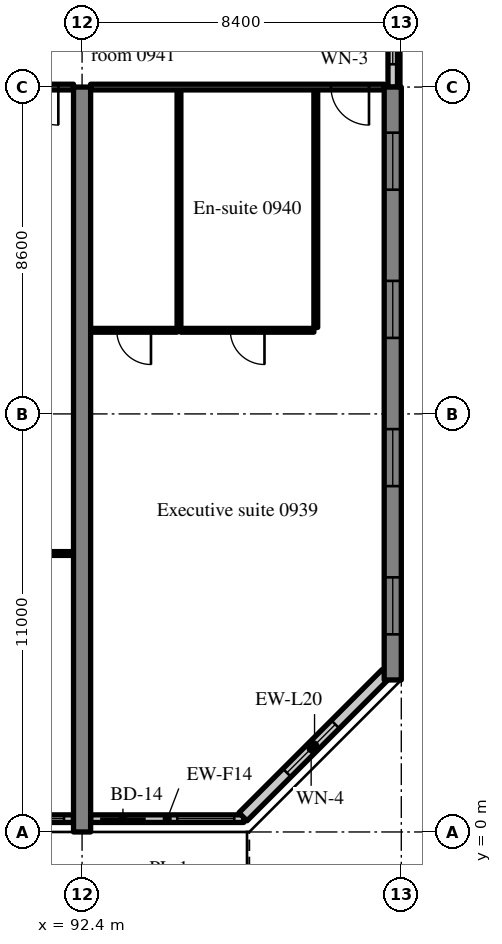
"""IFC4 building model, lengths in metres.
Left out: names, types, materials, properties, quantities, classifications, styles, units other than length and angle.
Written with IfcOpenShell. Run it as: python <this file> out.ifc"""

import sys

from ifc_helpers import new_model, si_unit, direction, frame, frame_2d, origin, place, context, subcontext, project, spatial, rectangle, extrude, source, transform, mapped, element, fill, save


model = new_model("IFC4")
c1 = context("Model", 3, precision=1e-05, world=origin(), true_north=direction((0.0, 1.0)))
c2 = subcontext(c1, "Body", "Model", "MODEL_VIEW")
j1 = project(units=[si_unit("LENGTHUNIT", "METRE"), si_unit("PLANEANGLEUNIT", "RADIAN")], contexts=[c1])
p1 = place(None, origin())
s1 = spatial("IfcSite", under=j1, at=p1, CompositionType="ELEMENT")
p2 = place(p1, origin())
s2 = spatial("IfcBuilding", under=s1, at=p2, CompositionType="ELEMENT")
p3 = place(p2, frame((0.0, 0.0, 43.0)))
s3 = spatial("IfcBuildingStorey", under=s2, at=p3, CompositionType="ELEMENT", Elevation=43.0)
m1 = source(origin(), c2, "Body", "SweptSolid", [
    extrude(rectangle(XDim=19.6, YDim=0.45, at=frame_2d((9.8, 0.0))), origin(), (0.0, 0.0, 1.0), 3.52),
])
p4 = place(p3, frame((92.4, 0.0, 0.0), z_axis=(0.0, 0.0, 1.0), x_axis=(0.0, 1.0, 0.0)))
e1 = element("IfcWall", 1, at=p4, inside=s3, PredefinedType="SHEAR", context=c2, shape_type="MappedRepresentation", body=[
    mapped(m1, transform((0.0, 0.0, 0.0), scale=1.0)),
])
m2 = source(origin(), c2, "Body", "SweptSolid", [
    extrude(rectangle(XDim=15.6, YDim=0.45, at=frame_2d((7.8, 0.0))), origin(), (0.0, 0.0, 1.0), 3.52),
])
p5 = place(p3, frame((100.575, 4.0, 0.0), z_axis=(0.0, 0.0, 1.0), x_axis=(0.0, 1.0, 0.0)))
e2 = element("IfcWall", 2, at=p5, inside=s3, PredefinedType="SHEAR", context=c2, shape_type="MappedRepresentation", body=[
    mapped(m2, transform((0.0, 0.0, 0.0), scale=1.0)),
])
m3 = source(origin(), c2, "Body", "SweptSolid", [
    extrude(rectangle(XDim=1.5, YDim=1.5, at=frame_2d((0.75, 0.75))), frame((0.0, 0.235, 0.0), z_axis=(0.0, -1.0, 0.0), x_axis=(1.0, 0.0, 0.0)), (0.0, 0.0, 1.0), 0.47),
])
p6 = place(p5, frame((1.2, 0.0, 0.9)))
e3 = element("IfcOpeningElement", 3, at=p6, cuts=e2, PredefinedType="OPENING", context=c2, shape_type="MappedRepresentation", body=[
    mapped(m3, transform((0.0, 0.0, 0.0), scale=1.0)),
])
p7 = place(p5, frame((5.1, 0.0, 0.9)))
e4 = element("IfcOpeningElement", 4, at=p7, cuts=e2, PredefinedType="OPENING", context=c2, shape_type="MappedRepresentation", body=[
    mapped(m3, transform((0.0, 0.0, 0.0), scale=1.0)),
])
p8 = place(p5, frame((9.0, 0.0, 0.9)))
e5 = element("IfcOpeningElement", 5, at=p8, cuts=e2, PredefinedType="OPENING", context=c2, shape_type="MappedRepresentation", body=[
    mapped(m3, transform((0.0, 0.0, 0.0), scale=1.0)),
])
p9 = place(p5, frame((12.9, 0.0, 0.9)))
e6 = element("IfcOpeningElement", 6, at=p9, cuts=e2, PredefinedType="OPENING", context=c2, shape_type="MappedRepresentation", body=[
    mapped(m3, transform((0.0, 0.0, 0.0), scale=1.0)),
])
m4 = source(origin(), c2, "Body", "SweptSolid", [
    extrude(rectangle(XDim=3.525, YDim=0.2, at=frame_2d((1.763, 0.0))), origin(), (0.0, 0.0, 1.0), 2.82),
])
p10 = place(p3, frame((88.65, 0.35, 0.0), z_axis=(0.0, 0.0, 1.0), x_axis=(1.0, 0.0, 0.0)))
e7 = element("IfcWall", 7, at=p10, inside=s3, PredefinedType="SOLIDWALL", context=c2, shape_type="MappedRepresentation", body=[
    mapped(m4, transform((0.0, 0.0, 0.0), scale=1.0)),
])
m5 = source(origin(), c2, "Body", "SweptSolid", [
    extrude(rectangle(XDim=1.2, YDim=2.4, at=frame_2d((0.6, 1.2))), frame((0.0, 0.11, 0.0), z_axis=(0.0, -1.0, 0.0), x_axis=(1.0, 0.0, 0.0)), (0.0, 0.0, 1.0), 0.22),
])
p11 = place(p10, frame((0.25, 0.0, 0.0)))
e8 = element("IfcOpeningElement", 8, at=p11, cuts=e7, PredefinedType="OPENING", context=c2, shape_type="MappedRepresentation", body=[
    mapped(m5, transform((0.0, 0.0, 0.0), scale=1.0)),
])
m6 = source(origin(), c2, "Body", "SweptSolid", [
    extrude(rectangle(XDim=1.5, YDim=1.5, at=frame_2d((0.75, 0.75))), frame((0.0, 0.11, 0.0), z_axis=(0.0, -1.0, 0.0), x_axis=(1.0, 0.0, 0.0)), (0.0, 0.0, 1.0), 0.22),
])
p12 = place(p10, frame((1.775, 0.0, 0.9)))
e9 = element("IfcOpeningElement", 9, at=p12, cuts=e7, PredefinedType="OPENING", context=c2, shape_type="MappedRepresentation", body=[
    mapped(m6, transform((0.0, 0.0, 0.0), scale=1.0)),
])
m7 = source(origin(), c2, "Body", "SweptSolid", [
    extrude(rectangle(XDim=4.03, YDim=0.2, at=frame_2d((2.015, 0.0))), origin(), (0.0, 0.0, 1.0), 2.82),
])
p13 = place(p3, frame((92.625, 0.35, 0.0), z_axis=(0.0, 0.0, 1.0), x_axis=(1.0, 0.0, 0.0)))
e10 = element("IfcWall", 10, at=p13, inside=s3, PredefinedType="SOLIDWALL", context=c2, shape_type="MappedRepresentation", body=[
    mapped(m7, transform((0.0, 0.0, 0.0), scale=1.0)),
])
p14 = place(p13, frame((0.25, 0.0, 0.0)))
e11 = element("IfcOpeningElement", 11, at=p14, cuts=e10, PredefinedType="OPENING", context=c2, shape_type="MappedRepresentation", body=[
    mapped(m5, transform((0.0, 0.0, 0.0), scale=1.0)),
])
p15 = place(p13, frame((2.28, 0.0, 0.9)))
e12 = element("IfcOpeningElement", 12, at=p15, cuts=e10, PredefinedType="OPENING", context=c2, shape_type="MappedRepresentation", body=[
    mapped(m6, transform((0.0, 0.0, 0.0), scale=1.0)),
])
m8 = source(origin(), c2, "Body", "SweptSolid", [
    extrude(rectangle(XDim=5.326, YDim=0.3, at=frame_2d((2.663, 0.0))), origin(), (0.0, 0.0, 1.0), 3.52),
])
p16 = place(p3, frame((96.634, 0.4, 0.0), z_axis=(0.0, 0.0, 1.0), x_axis=(0.707083859269, 0.707129702361, 0.0)))
e13 = element("IfcWall", 13, at=p16, inside=s3, PredefinedType="SOLIDWALL", context=c2, shape_type="MappedRepresentation", body=[
    mapped(m8, transform((0.0, 0.0, 0.0), scale=1.0)),
])
m9 = source(origin(), c2, "Body", "SweptSolid", [
    extrude(rectangle(XDim=1.8, YDim=1.5, at=frame_2d((0.9, 0.75))), frame((0.0, 0.16, 0.0), z_axis=(0.0, -1.0, 0.0), x_axis=(1.0, 0.0, 0.0)), (0.0, 0.0, 1.0), 0.32),
])
p17 = place(p16, frame((1.636, 0.0, 0.9)))
e14 = element("IfcOpeningElement", 14, at=p17, cuts=e13, PredefinedType="OPENING", context=c2, shape_type="MappedRepresentation", body=[
    mapped(m9, transform((0.0, 0.0, 0.0), scale=1.0)),
])
m10 = source(origin(), c2, "Body", "SweptSolid", [
    extrude(rectangle(XDim=2.4, YDim=0.25, at=frame_2d((1.2, 0.0))), origin(), (0.0, 0.0, 1.0), 2.62),
])
p18 = place(p3, frame((100.575, 19.6, 0.0), z_axis=(0.0, 0.0, 1.0), x_axis=(0.0, 1.0, 0.0)))
e15 = element("IfcWall", 15, at=p18, inside=s3, PredefinedType="SOLIDWALL", context=c2, shape_type="MappedRepresentation", body=[
    mapped(m10, transform((0.0, 0.0, 0.0), scale=1.0)),
])
m11 = source(origin(), c2, "Body", "SweptSolid", [
    extrude(rectangle(XDim=1.2, YDim=1.5, at=frame_2d((0.6, 0.75))), frame((0.0, 0.135, 0.0), z_axis=(0.0, -1.0, 0.0), x_axis=(1.0, 0.0, 0.0)), (0.0, 0.0, 1.0), 0.27),
])
p19 = place(p18, frame((0.6, 0.0, 0.9)))
e16 = element("IfcOpeningElement", 16, at=p19, cuts=e15, PredefinedType="OPENING", context=c2, shape_type="MappedRepresentation", body=[
    mapped(m11, transform((0.0, 0.0, 0.0), scale=1.0)),
])
m12 = source(origin(), c2, "Body", "SweptSolid", [
    extrude(rectangle(XDim=7.95, YDim=0.1, at=frame_2d((3.975, 0.0))), origin(), (0.0, 0.0, 1.0), 3.52),
])
p20 = place(p3, frame((84.225, 7.327, 0.0), z_axis=(0.0, 0.0, 1.0), x_axis=(1.0, 0.0, 0.0)))
e17 = element("IfcWall", 17, at=p20, inside=s3, PredefinedType="PARTITIONING", context=c2, shape_type="MappedRepresentation", body=[
    mapped(m12, transform((0.0, 0.0, 0.0), scale=1.0)),
])
m13 = source(origin(), c2, "Body", "SweptSolid", [
    extrude(rectangle(XDim=1.8, YDim=2.1, at=frame_2d((0.9, 1.05))), frame((0.0, 0.06, 0.0), z_axis=(0.0, -1.0, 0.0), x_axis=(1.0, 0.0, 0.0)), (0.0, 0.0, 1.0), 0.12),
])
p21 = place(p20, frame((3.075, 0.0, 0.0)))
e18 = element("IfcOpeningElement", 18, at=p21, cuts=e17, PredefinedType="OPENING", context=c2, shape_type="MappedRepresentation", body=[
    mapped(m13, transform((0.0, 0.0, 0.0), scale=1.0)),
])
m14 = source(origin(), c2, "Body", "SweptSolid", [
    extrude(rectangle(XDim=7.95, YDim=0.15, at=frame_2d((3.975, 0.0))), origin(), (0.0, 0.0, 1.0), 2.82),
])
p22 = place(p3, frame((84.225, 19.6, 0.0), z_axis=(0.0, 0.0, 1.0), x_axis=(1.0, 0.0, 0.0)))
e19 = element("IfcWall", 19, at=p22, inside=s3, PredefinedType="PARTITIONING", context=c2, shape_type="MappedRepresentation", body=[
    mapped(m14, transform((0.0, 0.0, 0.0), scale=1.0)),
])
m15 = source(origin(), c2, "Body", "SweptSolid", [
    extrude(rectangle(XDim=1.0, YDim=2.1, at=frame_2d((0.5, 1.05))), frame((0.0, 0.085, 0.0), z_axis=(0.0, -1.0, 0.0), x_axis=(1.0, 0.0, 0.0)), (0.0, 0.0, 1.0), 0.17),
])
p23 = place(p22, frame((6.55, 0.0, 0.0)))
e20 = element("IfcOpeningElement", 20, at=p23, cuts=e19, PredefinedType="OPENING", context=c2, shape_type="MappedRepresentation", body=[
    mapped(m15, transform((0.0, 0.0, 0.0), scale=1.0)),
])
m16 = source(origin(), c2, "Body", "SweptSolid", [
    extrude(rectangle(XDim=6.25, YDim=0.1, at=frame_2d((3.125, 0.0))), origin(), (0.0, 0.0, 1.0), 3.52),
])
for number, where, z_axis, x_axis in (
    (21, (98.55, 13.275, 0.0), (0.0, 0.0, 1.0), (0.0, 1.0, 0.0)),
    (22, (94.95, 13.275, 0.0), (0.0, 0.0, 1.0), (0.0, 1.0, 0.0)),
):
    element("IfcWall", number, at=place(p3, frame(where, z_axis=z_axis, x_axis=x_axis)), inside=s3, PredefinedType="PARTITIONING", context=c2, shape_type="MappedRepresentation", body=[
        mapped(m16, transform((0.0, 0.0, 0.0), scale=1.0)),
    ])
m17 = source(origin(), c2, "Body", "SweptSolid", [
    extrude(rectangle(XDim=3.5, YDim=0.1, at=frame_2d((1.75, 0.0))), origin(), (0.0, 0.0, 1.0), 3.52),
])
p24 = place(p3, frame((95.0, 13.2, 0.0), z_axis=(0.0, 0.0, 1.0), x_axis=(1.0, 0.0, 0.0)))
e23 = element("IfcWall", 23, at=p24, inside=s3, PredefinedType="PARTITIONING", context=c2, shape_type="MappedRepresentation", body=[
    mapped(m17, transform((0.0, 0.0, 0.0), scale=1.0)),
])
m18 = source(origin(), c2, "Body", "SweptSolid", [
    extrude(rectangle(XDim=0.9, YDim=2.1, at=frame_2d((0.45, 1.05))), frame((0.0, 0.06, 0.0), z_axis=(0.0, -1.0, 0.0), x_axis=(1.0, 0.0, 0.0)), (0.0, 0.0, 1.0), 0.12),
])
p25 = place(p24, frame((1.3, 0.0, 0.0)))
e24 = element("IfcOpeningElement", 24, at=p25, cuts=e23, PredefinedType="OPENING", context=c2, shape_type="MappedRepresentation", body=[
    mapped(m18, transform((0.0, 0.0, 0.0), scale=1.0)),
])
m19 = source(origin(), c2, "Body", "SweptSolid", [
    extrude(rectangle(XDim=2.275, YDim=0.1, at=frame_2d((1.137, 0.0))), origin(), (0.0, 0.0, 1.0), 3.52),
])
p26 = place(p3, frame((92.625, 13.2, 0.0), z_axis=(0.0, 0.0, 1.0), x_axis=(1.0, 0.0, 0.0)))
e25 = element("IfcWall", 25, at=p26, inside=s3, PredefinedType="PARTITIONING", context=c2, shape_type="MappedRepresentation", body=[
    mapped(m19, transform((0.0, 0.0, 0.0), scale=1.0)),
])
p27 = place(p26, frame((0.688, 0.0, 0.0)))
e26 = element("IfcOpeningElement", 26, at=p27, cuts=e25, PredefinedType="OPENING", context=c2, shape_type="MappedRepresentation", body=[
    mapped(m18, transform((0.0, 0.0, 0.0), scale=1.0)),
])
m20 = source(origin(), c2, "Body", "SweptSolid", [
    extrude(rectangle(XDim=7.725, YDim=0.15, at=frame_2d((3.863, 0.0))), origin(), (0.0, 0.0, 1.0), 2.82),
])
p28 = place(p3, frame((92.625, 19.6, 0.0), z_axis=(0.0, 0.0, 1.0), x_axis=(1.0, 0.0, 0.0)))
e27 = element("IfcWall", 27, at=p28, inside=s3, PredefinedType="PARTITIONING", context=c2, shape_type="MappedRepresentation", body=[
    mapped(m20, transform((0.0, 0.0, 0.0), scale=1.0)),
])
p29 = place(p28, frame((6.325, 0.0, 0.0)))
e28 = element("IfcOpeningElement", 28, at=p29, cuts=e27, PredefinedType="OPENING", context=c2, shape_type="MappedRepresentation", body=[
    mapped(m15, transform((0.0, 0.0, 0.0), scale=1.0)),
])
m21 = source(origin(), c2, "Body", "SweptSolid", [
    extrude(rectangle(XDim=1.5, YDim=1.5, at=frame_2d((0.75, 0.75))), frame((0.0, 0.03, 0.0), z_axis=(0.0, -1.0, 0.0), x_axis=(1.0, 0.0, 0.0)), (0.0, 0.0, 1.0), 0.06),
])
p30 = place(p12, origin())
e29 = element("IfcWindow", 29, at=p30, inside=s3, PartitioningType="SINGLE_PANEL", PredefinedType="WINDOW", context=c2, shape_type="MappedRepresentation", body=[
    mapped(m21, transform((0.0, 0.0, 0.0), scale=1.0)),
])
fill(e9, e29)
m22 = source(origin(), c2, "Body", "SweptSolid", [
    extrude(rectangle(XDim=1.2, YDim=2.4, at=frame_2d((0.6, 1.2))), frame((0.0, 0.025, 0.0), z_axis=(0.0, -1.0, 0.0), x_axis=(1.0, 0.0, 0.0)), (0.0, 0.0, 1.0), 0.05),
])
p31 = place(p14, origin())
e30 = element("IfcDoor", 30, at=p31, inside=s3, OperationType="SLIDING_TO_RIGHT", PredefinedType="DOOR", context=c2, shape_type="MappedRepresentation", body=[
    mapped(m22, transform((0.0, 0.0, 0.0), scale=1.0)),
])
fill(e11, e30)
p32 = place(p15, origin())
e31 = element("IfcWindow", 31, at=p32, inside=s3, PartitioningType="SINGLE_PANEL", PredefinedType="WINDOW", context=c2, shape_type="MappedRepresentation", body=[
    mapped(m21, transform((0.0, 0.0, 0.0), scale=1.0)),
])
fill(e12, e31)
m23 = source(origin(), c2, "Body", "SweptSolid", [
    extrude(rectangle(XDim=1.8, YDim=1.5, at=frame_2d((0.9, 0.75))), frame((0.0, 0.03, 0.0), z_axis=(0.0, -1.0, 0.0), x_axis=(1.0, 0.0, 0.0)), (0.0, 0.0, 1.0), 0.06),
])
p33 = place(p17, origin())
e32 = element("IfcWindow", 32, at=p33, inside=s3, PartitioningType="SINGLE_PANEL", PredefinedType="WINDOW", context=c2, shape_type="MappedRepresentation", body=[
    mapped(m23, transform((0.0, 0.0, 0.0), scale=1.0)),
])
fill(e14, e32)
p34 = place(p6, origin())
e33 = element("IfcWindow", 33, at=p34, inside=s3, PartitioningType="SINGLE_PANEL", PredefinedType="WINDOW", context=c2, shape_type="MappedRepresentation", body=[
    mapped(m21, transform((0.0, 0.0, 0.0), scale=1.0)),
])
fill(e3, e33)
p35 = place(p7, origin())
e34 = element("IfcWindow", 34, at=p35, inside=s3, PartitioningType="SINGLE_PANEL", PredefinedType="WINDOW", context=c2, shape_type="MappedRepresentation", body=[
    mapped(m21, transform((0.0, 0.0, 0.0), scale=1.0)),
])
fill(e4, e34)
p36 = place(p8, origin())
e35 = element("IfcWindow", 35, at=p36, inside=s3, PartitioningType="SINGLE_PANEL", PredefinedType="WINDOW", context=c2, shape_type="MappedRepresentation", body=[
    mapped(m21, transform((0.0, 0.0, 0.0), scale=1.0)),
])
fill(e5, e35)
p37 = place(p9, origin())
e36 = element("IfcWindow", 36, at=p37, inside=s3, PartitioningType="SINGLE_PANEL", PredefinedType="WINDOW", context=c2, shape_type="MappedRepresentation", body=[
    mapped(m21, transform((0.0, 0.0, 0.0), scale=1.0)),
])
fill(e6, e36)
m24 = source(origin(), c2, "Body", "SweptSolid", [
    extrude(rectangle(XDim=1.2, YDim=1.5, at=frame_2d((0.6, 0.75))), frame((0.0, 0.03, 0.0), z_axis=(0.0, -1.0, 0.0), x_axis=(1.0, 0.0, 0.0)), (0.0, 0.0, 1.0), 0.06),
])
p38 = place(p19, origin())
e37 = element("IfcWindow", 37, at=p38, inside=s3, PartitioningType="SINGLE_PANEL", PredefinedType="WINDOW", context=c2, shape_type="MappedRepresentation", body=[
    mapped(m24, transform((0.0, 0.0, 0.0), scale=1.0)),
])
fill(e16, e37)
m25 = source(origin(), c2, "Body", "SweptSolid", [
    extrude(rectangle(XDim=1.0, YDim=2.1, at=frame_2d((0.5, 1.05))), frame((0.0, 0.025, 0.0), z_axis=(0.0, -1.0, 0.0), x_axis=(1.0, 0.0, 0.0)), (0.0, 0.0, 1.0), 0.05),
])
p39 = place(p23, origin())
e38 = element("IfcDoor", 38, at=p39, inside=s3, OperationType="SINGLE_SWING_RIGHT", PredefinedType="DOOR", context=c2, shape_type="MappedRepresentation", body=[
    mapped(m25, transform((0.0, 0.0, 0.0), scale=1.0)),
])
fill(e20, e38)
m26 = source(origin(), c2, "Body", "SweptSolid", [
    extrude(rectangle(XDim=0.9, YDim=2.1, at=frame_2d((0.45, 1.05))), frame((0.0, 0.025, 0.0), z_axis=(0.0, -1.0, 0.0), x_axis=(1.0, 0.0, 0.0)), (0.0, 0.0, 1.0), 0.05),
])
p40 = place(p25, origin())
e39 = element("IfcDoor", 39, at=p40, inside=s3, OperationType="SINGLE_SWING_RIGHT", PredefinedType="DOOR", context=c2, shape_type="MappedRepresentation", body=[
    mapped(m26, transform((0.0, 0.0, 0.0), scale=1.0)),
])
fill(e24, e39)
p41 = place(p27, origin())
e40 = element("IfcDoor", 40, at=p41, inside=s3, OperationType="SINGLE_SWING_RIGHT", PredefinedType="DOOR", context=c2, shape_type="MappedRepresentation", body=[
    mapped(m26, transform((0.0, 0.0, 0.0), scale=1.0)),
])
fill(e26, e40)
p42 = place(p29, origin())
e41 = element("IfcDoor", 41, at=p42, inside=s3, OperationType="SINGLE_SWING_RIGHT", PredefinedType="DOOR", context=c2, shape_type="MappedRepresentation", body=[
    mapped(m25, transform((0.0, 0.0, 0.0), scale=1.0)),
])
fill(e28, e41)
save(model, sys.argv[1])
